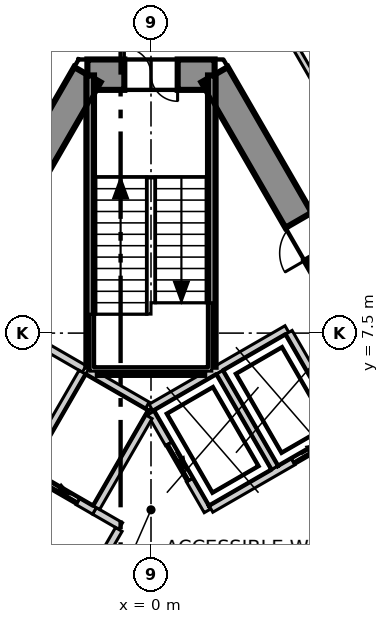
"""IFC4 building model, lengths in metres.
Left out: names, types, materials, properties, quantities, classifications, styles, units other than length and angle.
Written with IfcOpenShell. Run it as: python <this file> out.ifc"""

import sys

from ifc_helpers import new_model, si_unit, direction, frame, frame_2d, origin, place, context, subcontext, project, spatial, polyline, rectangle, outline, extrude, element, fill, save


model = new_model("IFC4")
c1 = context("Model", 3, precision=1e-05, world=origin(), true_north=direction((0.0, 1.0)))
c2 = subcontext(c1, "Body", "Model", "MODEL_VIEW")
j1 = project(units=[si_unit("LENGTHUNIT", "METRE"), si_unit("PLANEANGLEUNIT", "RADIAN")], contexts=[c1])
p1 = place(None, origin())
s1 = spatial("IfcSite", under=j1, at=p1, CompositionType="ELEMENT")
p2 = place(p1, origin())
s2 = spatial("IfcBuilding", under=s1, at=p2, CompositionType="ELEMENT")
p3 = place(p2, frame((0.0, 0.0, 164.3)))
s3 = spatial("IfcBuildingStorey", under=s2, at=p3, CompositionType="ELEMENT", Elevation=164.3)
p4 = place(p3, frame((1.674, 14.3, -0.3), z_axis=(0.0, 0.0, 1.0), x_axis=(-1.0, 0.0, 0.0)))
e1 = element("IfcWall", 1, at=p4, inside=s3, PredefinedType="SHEAR", context=c2, shape_type="SweptSolid", body=[
    extrude(outline(polyline([(-0.231, -0.4), (1.674, -0.4), (3.579, -0.4), (3.117, 0.4), (1.674, 0.4), (0.231, 0.4), (-0.231, -0.4)])), origin(), (0.0, 0.0, 1.0), 4.0),
])
p5 = place(p4, frame((0.974, 0.0, 0.3)))
e2 = element("IfcOpeningElement", 2, at=p5, cuts=e1, PredefinedType="OPENING", context=c2, shape_type="SweptSolid", body=[
    extrude(rectangle(XDim=1.4, YDim=2.1, at=frame_2d((0.7, 1.05))), frame((0.0, 0.41, 0.0), z_axis=(0.0, -1.0, 0.0), x_axis=(1.0, 0.0, 0.0)), (0.0, 0.0, 1.0), 0.82),
])
p6 = place(p3, frame((-1.674, 14.3, -0.3), z_axis=(0.0, 0.0, 1.0), x_axis=(-0.499995765644, -0.866027848477, 0.0)))
e3 = element("IfcWall", 3, at=p6, inside=s3, PredefinedType="SHEAR", context=c2, shape_type="SweptSolid", body=[
    extrude(outline(polyline([(-0.231, -0.4), (1.732, -0.4), (3.695, -0.4), (5.658, -0.4), (7.621, -0.4), (9.584, -0.4), (11.547, -0.4), (13.51, -0.4), (15.473, -0.4), (17.436, -0.4), (19.399, -0.4), (21.362, -0.4), (23.325, -0.4), (22.863, 0.4), (20.977, 0.4), (19.091, 0.4), (17.205, 0.4), (15.319, 0.4), (13.433, 0.4), (11.547, 0.4), (9.661, 0.4), (7.775, 0.4), (5.889, 0.4), (4.003, 0.4), (2.117, 0.4), (0.231, 0.4), (-0.231, -0.4)])), origin(), (0.0, 0.0, 1.0), 4.0),
])
p7 = place(p6, frame((10.997, 0.0, 0.3)))
e4 = element("IfcOpeningElement", 4, at=p7, cuts=e3, PredefinedType="OPENING", context=c2, shape_type="SweptSolid", body=[
    extrude(rectangle(XDim=1.1, YDim=2.1, at=frame_2d((0.55, 1.05))), frame((0.0, 0.41, 0.0), z_axis=(0.0, -1.0, 0.0), x_axis=(1.0, 0.0, 0.0)), (0.0, 0.0, 1.0), 0.82),
])
p8 = place(p3, frame((13.221, -5.7, -0.3), z_axis=(0.0, 0.0, 1.0), x_axis=(-0.499995765644, 0.866027848477, 0.0)))
e5 = element("IfcWall", 5, at=p8, inside=s3, PredefinedType="SHEAR", context=c2, shape_type="SweptSolid", body=[
    extrude(outline(polyline([(-0.231, -0.4), (1.732, -0.4), (3.695, -0.4), (5.658, -0.4), (7.621, -0.4), (9.584, -0.4), (11.547, -0.4), (13.51, -0.4), (15.473, -0.4), (17.436, -0.4), (19.399, -0.4), (21.362, -0.4), (23.325, -0.4), (22.863, 0.4), (20.977, 0.4), (19.091, 0.4), (17.205, 0.4), (15.319, 0.4), (13.433, 0.4), (11.547, 0.4), (9.661, 0.4), (7.775, 0.4), (5.889, 0.4), (4.003, 0.4), (2.117, 0.4), (0.231, 0.4), (-0.231, -0.4)])), origin(), (0.0, 0.0, 1.0), 4.0),
])
p9 = place(p8, frame((10.647, 0.0, 0.3)))
e6 = element("IfcOpeningElement", 6, at=p9, cuts=e5, PredefinedType="OPENING", context=c2, shape_type="SweptSolid", body=[
    extrude(rectangle(XDim=1.8, YDim=2.1, at=frame_2d((0.9, 1.05))), frame((0.0, 0.41, 0.0), z_axis=(0.0, -1.0, 0.0), x_axis=(1.0, 0.0, 0.0)), (0.0, 0.0, 1.0), 0.82),
])
p10 = place(p8, frame((17.671, 0.0, 0.3)))
e7 = element("IfcOpeningElement", 7, at=p10, cuts=e5, PredefinedType="OPENING", context=c2, shape_type="SweptSolid", body=[
    extrude(rectangle(XDim=1.0, YDim=2.1, at=frame_2d((0.5, 1.05))), frame((0.0, 0.41, 0.0), z_axis=(0.0, -1.0, 0.0), x_axis=(1.0, 0.0, 0.0)), (0.0, 0.0, 1.0), 0.82),
])
p11 = place(p3, frame((30.204, -14.006, 0.0), z_axis=(0.0, 0.0, 1.0), x_axis=(-0.500008017777, 0.866020774669, 0.0)))
e8 = element("IfcWall", 8, at=p11, inside=s3, PredefinedType="ELEMENTEDWALL", context=c2, shape_type="SweptSolid", body=[
    extrude(rectangle(XDim=54.443, YDim=0.2, at=frame_2d((27.222, 0.0))), origin(), (0.0, 0.0, 1.0), 3.7),
])
p12 = place(p11, frame((2.094, 0.0, 0.9)))
e9 = element("IfcOpeningElement", 9, at=p12, cuts=e8, PredefinedType="OPENING", context=c2, shape_type="SweptSolid", body=[
    extrude(rectangle(XDim=4.9, YDim=2.5, at=frame_2d((2.45, 1.25))), frame((0.0, 0.11, 0.0), z_axis=(0.0, -1.0, 0.0), x_axis=(1.0, 0.0, 0.0)), (0.0, 0.0, 1.0), 0.22),
])
p13 = place(p11, frame((8.576, 0.0, 0.9)))
e10 = element("IfcOpeningElement", 10, at=p13, cuts=e8, PredefinedType="OPENING", context=c2, shape_type="SweptSolid", body=[
    extrude(rectangle(XDim=4.9, YDim=2.5, at=frame_2d((2.45, 1.25))), frame((0.0, 0.11, 0.0), z_axis=(0.0, -1.0, 0.0), x_axis=(1.0, 0.0, 0.0)), (0.0, 0.0, 1.0), 0.22),
])
p14 = place(p11, frame((15.058, 0.0, 0.9)))
e11 = element("IfcOpeningElement", 11, at=p14, cuts=e8, PredefinedType="OPENING", context=c2, shape_type="SweptSolid", body=[
    extrude(rectangle(XDim=4.9, YDim=2.5, at=frame_2d((2.45, 1.25))), frame((0.0, 0.11, 0.0), z_axis=(0.0, -1.0, 0.0), x_axis=(1.0, 0.0, 0.0)), (0.0, 0.0, 1.0), 0.22),
])
p15 = place(p11, frame((21.54, 0.0, 0.9)))
e12 = element("IfcOpeningElement", 12, at=p15, cuts=e8, PredefinedType="OPENING", context=c2, shape_type="SweptSolid", body=[
    extrude(rectangle(XDim=4.9, YDim=2.5, at=frame_2d((2.45, 1.25))), frame((0.0, 0.11, 0.0), z_axis=(0.0, -1.0, 0.0), x_axis=(1.0, 0.0, 0.0)), (0.0, 0.0, 1.0), 0.22),
])
p16 = place(p11, frame((28.023, 0.0, 0.9)))
e13 = element("IfcOpeningElement", 13, at=p16, cuts=e8, PredefinedType="OPENING", context=c2, shape_type="SweptSolid", body=[
    extrude(rectangle(XDim=4.9, YDim=2.5, at=frame_2d((2.45, 1.25))), frame((0.0, 0.11, 0.0), z_axis=(0.0, -1.0, 0.0), x_axis=(1.0, 0.0, 0.0)), (0.0, 0.0, 1.0), 0.22),
])
p17 = place(p11, frame((34.505, 0.0, 0.9)))
e14 = element("IfcOpeningElement", 14, at=p17, cuts=e8, PredefinedType="OPENING", context=c2, shape_type="SweptSolid", body=[
    extrude(rectangle(XDim=4.9, YDim=2.5, at=frame_2d((2.45, 1.25))), frame((0.0, 0.11, 0.0), z_axis=(0.0, -1.0, 0.0), x_axis=(1.0, 0.0, 0.0)), (0.0, 0.0, 1.0), 0.22),
])
p18 = place(p11, frame((40.987, 0.0, 0.9)))
e15 = element("IfcOpeningElement", 15, at=p18, cuts=e8, PredefinedType="OPENING", context=c2, shape_type="SweptSolid", body=[
    extrude(rectangle(XDim=4.9, YDim=2.5, at=frame_2d((2.45, 1.25))), frame((0.0, 0.11, 0.0), z_axis=(0.0, -1.0, 0.0), x_axis=(1.0, 0.0, 0.0)), (0.0, 0.0, 1.0), 0.22),
])
p19 = place(p11, frame((47.469, 0.0, 0.9)))
e16 = element("IfcOpeningElement", 16, at=p19, cuts=e8, PredefinedType="OPENING", context=c2, shape_type="SweptSolid", body=[
    extrude(rectangle(XDim=4.9, YDim=2.5, at=frame_2d((2.45, 1.25))), frame((0.0, 0.11, 0.0), z_axis=(0.0, -1.0, 0.0), x_axis=(1.0, 0.0, 0.0)), (0.0, 0.0, 1.0), 0.22),
])
p20 = place(p3, frame((-8.903, 6.18, 0.0), z_axis=(0.0, 0.0, 1.0), x_axis=(0.500010074151, 0.866019587393, 0.0)))
e17 = element("IfcWall", 17, at=p20, inside=s3, PredefinedType="PARTITIONING", context=c2, shape_type="SweptSolid", body=[
    extrude(rectangle(XDim=17.806, YDim=0.15, at=frame_2d((8.903, 0.0))), origin(), (0.0, 0.0, 1.0), 3.7),
])
p21 = place(p20, frame((14.356, 0.0, 0.0)))
e18 = element("IfcOpeningElement", 18, at=p21, cuts=e17, PredefinedType="OPENING", context=c2, shape_type="SweptSolid", body=[
    extrude(rectangle(XDim=1.1, YDim=2.1, at=frame_2d((0.55, 1.05))), frame((0.0, 0.085, 0.0), z_axis=(0.0, -1.0, 0.0), x_axis=(1.0, 0.0, 0.0)), (0.0, 0.0, 1.0), 0.17),
])
p22 = place(p20, frame((10.014, 0.0, 0.0)))
e19 = element("IfcOpeningElement", 19, at=p22, cuts=e17, PredefinedType="OPENING", context=c2, shape_type="SweptSolid", body=[
    extrude(rectangle(XDim=0.9, YDim=2.1, at=frame_2d((0.45, 1.05))), frame((0.0, 0.085, 0.0), z_axis=(0.0, -1.0, 0.0), x_axis=(1.0, 0.0, 0.0)), (0.0, 0.0, 1.0), 0.17),
])
p23 = place(p20, frame((6.814, 0.0, 0.0)))
e20 = element("IfcOpeningElement", 20, at=p23, cuts=e17, PredefinedType="OPENING", context=c2, shape_type="SweptSolid", body=[
    extrude(rectangle(XDim=0.9, YDim=2.1, at=frame_2d((0.45, 1.05))), frame((0.0, 0.085, 0.0), z_axis=(0.0, -1.0, 0.0), x_axis=(1.0, 0.0, 0.0)), (0.0, 0.0, 1.0), 0.17),
])
p24 = place(p20, frame((4.014, 0.0, 0.0)))
e21 = element("IfcOpeningElement", 21, at=p24, cuts=e17, PredefinedType="OPENING", context=c2, shape_type="SweptSolid", body=[
    extrude(rectangle(XDim=1.0, YDim=2.1, at=frame_2d((0.5, 1.05))), frame((0.0, 0.085, 0.0), z_axis=(0.0, -1.0, 0.0), x_axis=(1.0, 0.0, 0.0)), (0.0, 0.0, 1.0), 0.17),
])
p25 = place(p3, frame((0.076, 21.468, 0.0), z_axis=(0.0, 0.0, 1.0), x_axis=(0.500024127084, -0.866011473558, 0.0)))
e22 = element("IfcWall", 22, at=p25, inside=s3, PredefinedType="PARTITIONING", context=c2, shape_type="SweptSolid", body=[
    extrude(rectangle(XDim=17.654, YDim=0.15, at=frame_2d((8.827, 0.0))), origin(), (0.0, 0.0, 1.0), 3.7),
])
p26 = place(p25, frame((11.104, 0.0, 0.0)))
e23 = element("IfcOpeningElement", 23, at=p26, cuts=e22, PredefinedType="OPENING", context=c2, shape_type="SweptSolid", body=[
    extrude(rectangle(XDim=1.1, YDim=2.1, at=frame_2d((0.55, 1.05))), frame((0.0, 0.085, 0.0), z_axis=(0.0, -1.0, 0.0), x_axis=(1.0, 0.0, 0.0)), (0.0, 0.0, 1.0), 0.17),
])
p27 = place(p25, frame((2.14, 0.0, 0.0)))
e24 = element("IfcOpeningElement", 24, at=p27, cuts=e22, PredefinedType="OPENING", context=c2, shape_type="SweptSolid", body=[
    extrude(rectangle(XDim=1.1, YDim=2.1, at=frame_2d((0.55, 1.05))), frame((0.0, 0.085, 0.0), z_axis=(0.0, -1.0, 0.0), x_axis=(1.0, 0.0, 0.0)), (0.0, 0.0, 1.0), 0.17),
])
p28 = place(p3, frame((-0.002, 5.542, 0.0), z_axis=(0.0, 0.0, 1.0), x_axis=(0.866103910842, 0.499863997127, 0.0)))
e25 = element("IfcWall", 25, at=p28, inside=s3, PredefinedType="SOLIDWALL", context=c2, shape_type="SweptSolid", body=[
    extrude(rectangle(XDim=4.131, YDim=0.2, at=frame_2d((2.065, 0.0))), origin(), (0.0, 0.0, 1.0), 3.7),
])
p29 = place(p3, frame((0.0, 5.4, 0.0), z_axis=(0.0, 0.0, 1.0), x_axis=(0.500103862429, -0.865965430478, 0.0)))
e26 = element("IfcWall", 26, at=p29, inside=s3, PredefinedType="SOLIDWALL", context=c2, shape_type="SweptSolid", body=[
    extrude(rectangle(XDim=2.973, YDim=0.2, at=frame_2d((1.487, 0.0))), origin(), (0.0, 0.0, 1.0), 3.7),
])
p30 = place(p29, frame((0.937, 0.0, 0.0)))
e27 = element("IfcOpeningElement", 27, at=p30, cuts=e26, PredefinedType="OPENING", context=c2, shape_type="SweptSolid", body=[
    extrude(rectangle(XDim=1.1, YDim=2.1, at=frame_2d((0.55, 1.05))), frame((0.0, 0.11, 0.0), z_axis=(0.0, -1.0, 0.0), x_axis=(1.0, 0.0, 0.0)), (0.0, 0.0, 1.0), 0.22),
])
p31 = place(p3, frame((1.577, 2.874, 0.0), z_axis=(0.0, 0.0, 1.0), x_axis=(0.866073694534, 0.499916348638, 0.0)))
e28 = element("IfcWall", 28, at=p31, inside=s3, PredefinedType="SOLIDWALL", context=c2, shape_type="SweptSolid", body=[
    extrude(rectangle(XDim=5.777, YDim=0.2, at=frame_2d((2.888, 0.0))), origin(), (0.0, 0.0, 1.0), 3.7),
])
p32 = place(p31, frame((2.497, 0.0, 0.0)))
e29 = element("IfcOpeningElement", 29, at=p32, cuts=e28, PredefinedType="OPENING", context=c2, shape_type="SweptSolid", body=[
    extrude(rectangle(XDim=1.1, YDim=2.1, at=frame_2d((0.55, 1.05))), frame((0.0, 0.11, 0.0), z_axis=(0.0, -1.0, 0.0), x_axis=(1.0, 0.0, 0.0)), (0.0, 0.0, 1.0), 0.22),
])
for number, where, z_axis, x_axis in (
    (30, (3.626, 7.52, 0.0), (0.0, 0.0, 1.0), (0.5, -0.866, 0.0)),
    (31, (1.807, 6.47, 0.0), (0.0, 0.0, 1.0), (0.5, -0.866, 0.0)),
):
    element("IfcWall", number, at=place(p3, frame(where, z_axis=z_axis, x_axis=x_axis)), inside=s3, PredefinedType="SOLIDWALL", context=c2, shape_type="SweptSolid", body=[
        extrude(rectangle(XDim=2.9, YDim=0.2, at=frame_2d((1.45, 0.0))), origin(), (0.0, 0.0, 1.0), 3.7),
    ])
p33 = place(p3, frame((3.278, -0.071, 0.0), z_axis=(0.0, 0.0, 1.0), x_axis=(0.865929348003, 0.5001663366, 0.0)))
e32 = element("IfcWall", 32, at=p33, inside=s3, PredefinedType="SOLIDWALL", context=c2, shape_type="SweptSolid", body=[
    extrude(rectangle(XDim=5.776, YDim=0.2, at=frame_2d((2.888, 0.0))), origin(), (0.0, 0.0, 1.0), 3.7),
])
p34 = place(p3, frame((-1.488, 2.822, 0.0), z_axis=(0.0, 0.0, 1.0), x_axis=(0.866236612152, -0.499633997809, 0.0)))
e33 = element("IfcWall", 33, at=p34, inside=s3, PredefinedType="SOLIDWALL", context=c2, shape_type="SweptSolid", body=[
    extrude(rectangle(XDim=0.796, YDim=0.2, at=frame_2d((0.398, 0.0))), origin(), (0.0, 0.0, 1.0), 3.7),
])
p35 = place(p3, frame((-3.489, 7.557, 0.0), z_axis=(0.0, 0.0, 1.0), x_axis=(0.866010750942, -0.50002537861, 0.0)))
e34 = element("IfcWall", 34, at=p35, inside=s3, PredefinedType="SOLIDWALL", context=c2, shape_type="SweptSolid", body=[
    extrude(rectangle(XDim=2.0, YDim=0.2, at=frame_2d((1.0, 0.0))), origin(), (0.0, 0.0, 1.0), 3.7),
])
p36 = place(p3, frame((-2.444, -0.433, 0.0), z_axis=(0.0, 0.0, 1.0), x_axis=(0.500035624827, 0.866004834804, 0.0)))
e35 = element("IfcWall", 35, at=p36, inside=s3, PredefinedType="SOLIDWALL", context=c2, shape_type="SweptSolid", body=[
    extrude(rectangle(XDim=3.194, YDim=0.2, at=frame_2d((1.597, 0.0))), origin(), (0.0, 0.0, 1.0), 3.7),
])
p37 = place(p3, frame((-3.309, 3.873, 0.0), z_axis=(0.0, 0.0, 1.0), x_axis=(0.866098583652, -0.499873227325, 0.0)))
e36 = element("IfcWall", 36, at=p37, inside=s3, PredefinedType="SOLIDWALL", context=c2, shape_type="SweptSolid", body=[
    extrude(rectangle(XDim=2.103, YDim=0.2, at=frame_2d((1.051, 0.0))), origin(), (0.0, 0.0, 1.0), 3.7),
])
p38 = place(p37, frame((0.502, 0.0, 0.0)))
e37 = element("IfcOpeningElement", 37, at=p38, cuts=e36, PredefinedType="OPENING", context=c2, shape_type="SweptSolid", body=[
    extrude(rectangle(XDim=1.1, YDim=2.1, at=frame_2d((0.55, 1.05))), frame((0.0, 0.11, 0.0), z_axis=(0.0, -1.0, 0.0), x_axis=(1.0, 0.0, 0.0)), (0.0, 0.0, 1.0), 0.22),
])
p39 = place(p3, frame((-3.257, 3.959, 0.0), z_axis=(0.0, 0.0, 1.0), x_axis=(0.50012328804, 0.865954211699, 0.0)))
e38 = element("IfcWall", 38, at=p39, inside=s3, PredefinedType="SOLIDWALL", context=c2, shape_type="SweptSolid", body=[
    extrude(rectangle(XDim=2.9, YDim=0.2, at=frame_2d((1.45, 0.0))), origin(), (0.0, 0.0, 1.0), 3.7),
])
p40 = place(p3, frame((-1.67, 6.507, 0.0), z_axis=(0.0, 0.0, 1.0), x_axis=(0.865941441609, -0.500145398563, 0.0)))
e39 = element("IfcWall", 39, at=p40, inside=s3, PredefinedType="SOLIDWALL", context=c2, shape_type="SweptSolid", body=[
    extrude(rectangle(XDim=1.815, YDim=0.2, at=frame_2d((0.908, 0.0))), origin(), (0.0, 0.0, 1.0), 3.7),
])
p41 = place(p3, frame((-1.438, 2.909, 0.0), z_axis=(0.0, 0.0, 1.0), x_axis=(0.499829630636, 0.866123744241, 0.0)))
e40 = element("IfcWall", 40, at=p41, inside=s3, PredefinedType="SOLIDWALL", context=c2, shape_type="SweptSolid", body=[
    extrude(rectangle(XDim=2.761, YDim=0.2, at=frame_2d((1.38, 0.0))), origin(), (0.0, 0.0, 1.0), 3.7),
])
p42 = place(p3, frame((1.6, 6.615, 0.0), z_axis=(0.0, 0.0, 1.0), x_axis=(0.0, 1.0, 0.0)))
e41 = element("IfcWall", 41, at=p42, inside=s3, PredefinedType="SOLIDWALL", context=c2, shape_type="SweptSolid", body=[
    extrude(rectangle(XDim=7.665, YDim=0.2, at=frame_2d((3.833, 0.0))), origin(), (0.0, 0.0, 1.0), 3.7),
])
p43 = place(p3, frame((-1.4, 6.5, 0.0), z_axis=(0.0, 0.0, 1.0), x_axis=(1.0, 0.0, 0.0)))
e42 = element("IfcWall", 42, at=p43, inside=s3, PredefinedType="SOLIDWALL", context=c2, shape_type="SweptSolid", body=[
    extrude(rectangle(XDim=2.8, YDim=0.2, at=frame_2d((1.4, 0.0))), origin(), (0.0, 0.0, 1.0), 3.7),
])
p44 = place(p3, frame((-1.6, 6.615, 0.0), z_axis=(0.0, 0.0, 1.0), x_axis=(0.0, 1.0, 0.0)))
e43 = element("IfcWall", 43, at=p44, inside=s3, PredefinedType="SOLIDWALL", context=c2, shape_type="SweptSolid", body=[
    extrude(rectangle(XDim=7.665, YDim=0.2, at=frame_2d((3.833, 0.0))), origin(), (0.0, 0.0, 1.0), 3.7),
])
p45 = place(p30, origin())
e44 = element("IfcDoor", 44, at=p45, inside=s3, OperationType="SLIDING_TO_LEFT", PredefinedType="DOOR", context=c2, shape_type="SweptSolid", body=[
    extrude(rectangle(XDim=1.1, YDim=2.1, at=frame_2d((0.55, 1.05))), frame((0.0, 0.025, 0.0), z_axis=(0.0, -1.0, 0.0), x_axis=(1.0, 0.0, 0.0)), (0.0, 0.0, 1.0), 0.05),
])
fill(e27, e44)
p46 = place(p32, origin())
e45 = element("IfcDoor", 45, at=p46, inside=s3, OperationType="SLIDING_TO_LEFT", PredefinedType="DOOR", context=c2, shape_type="SweptSolid", body=[
    extrude(rectangle(XDim=1.1, YDim=2.1, at=frame_2d((0.55, 1.05))), frame((0.0, 0.025, 0.0), z_axis=(0.0, -1.0, 0.0), x_axis=(1.0, 0.0, 0.0)), (0.0, 0.0, 1.0), 0.05),
])
fill(e29, e45)
p47 = place(p38, origin())
e46 = element("IfcDoor", 46, at=p47, inside=s3, OperationType="SLIDING_TO_LEFT", PredefinedType="DOOR", context=c2, shape_type="SweptSolid", body=[
    extrude(rectangle(XDim=1.1, YDim=2.1, at=frame_2d((0.55, 1.05))), frame((0.0, 0.025, 0.0), z_axis=(0.0, -1.0, 0.0), x_axis=(1.0, 0.0, 0.0)), (0.0, 0.0, 1.0), 0.05),
])
fill(e37, e46)
p48 = place(p5, origin())
e47 = element("IfcDoor", 47, at=p48, inside=s3, OperationType="DOUBLE_DOOR_SINGLE_SWING", PredefinedType="DOOR", context=c2, shape_type="SweptSolid", body=[
    extrude(rectangle(XDim=1.4, YDim=2.1, at=frame_2d((0.7, 1.05))), frame((0.0, 0.025, 0.0), z_axis=(0.0, -1.0, 0.0), x_axis=(1.0, 0.0, 0.0)), (0.0, 0.0, 1.0), 0.05),
])
fill(e2, e47)
p49 = place(p10, origin())
e48 = element("IfcDoor", 48, at=p49, inside=s3, OperationType="SINGLE_SWING_RIGHT", PredefinedType="DOOR", context=c2, shape_type="SweptSolid", body=[
    extrude(rectangle(XDim=1.0, YDim=2.1, at=frame_2d((0.5, 1.05))), frame((0.0, 0.025, 0.0), z_axis=(0.0, -1.0, 0.0), x_axis=(1.0, 0.0, 0.0)), (0.0, 0.0, 1.0), 0.05),
])
fill(e7, e48)
save(model, sys.argv[1])
